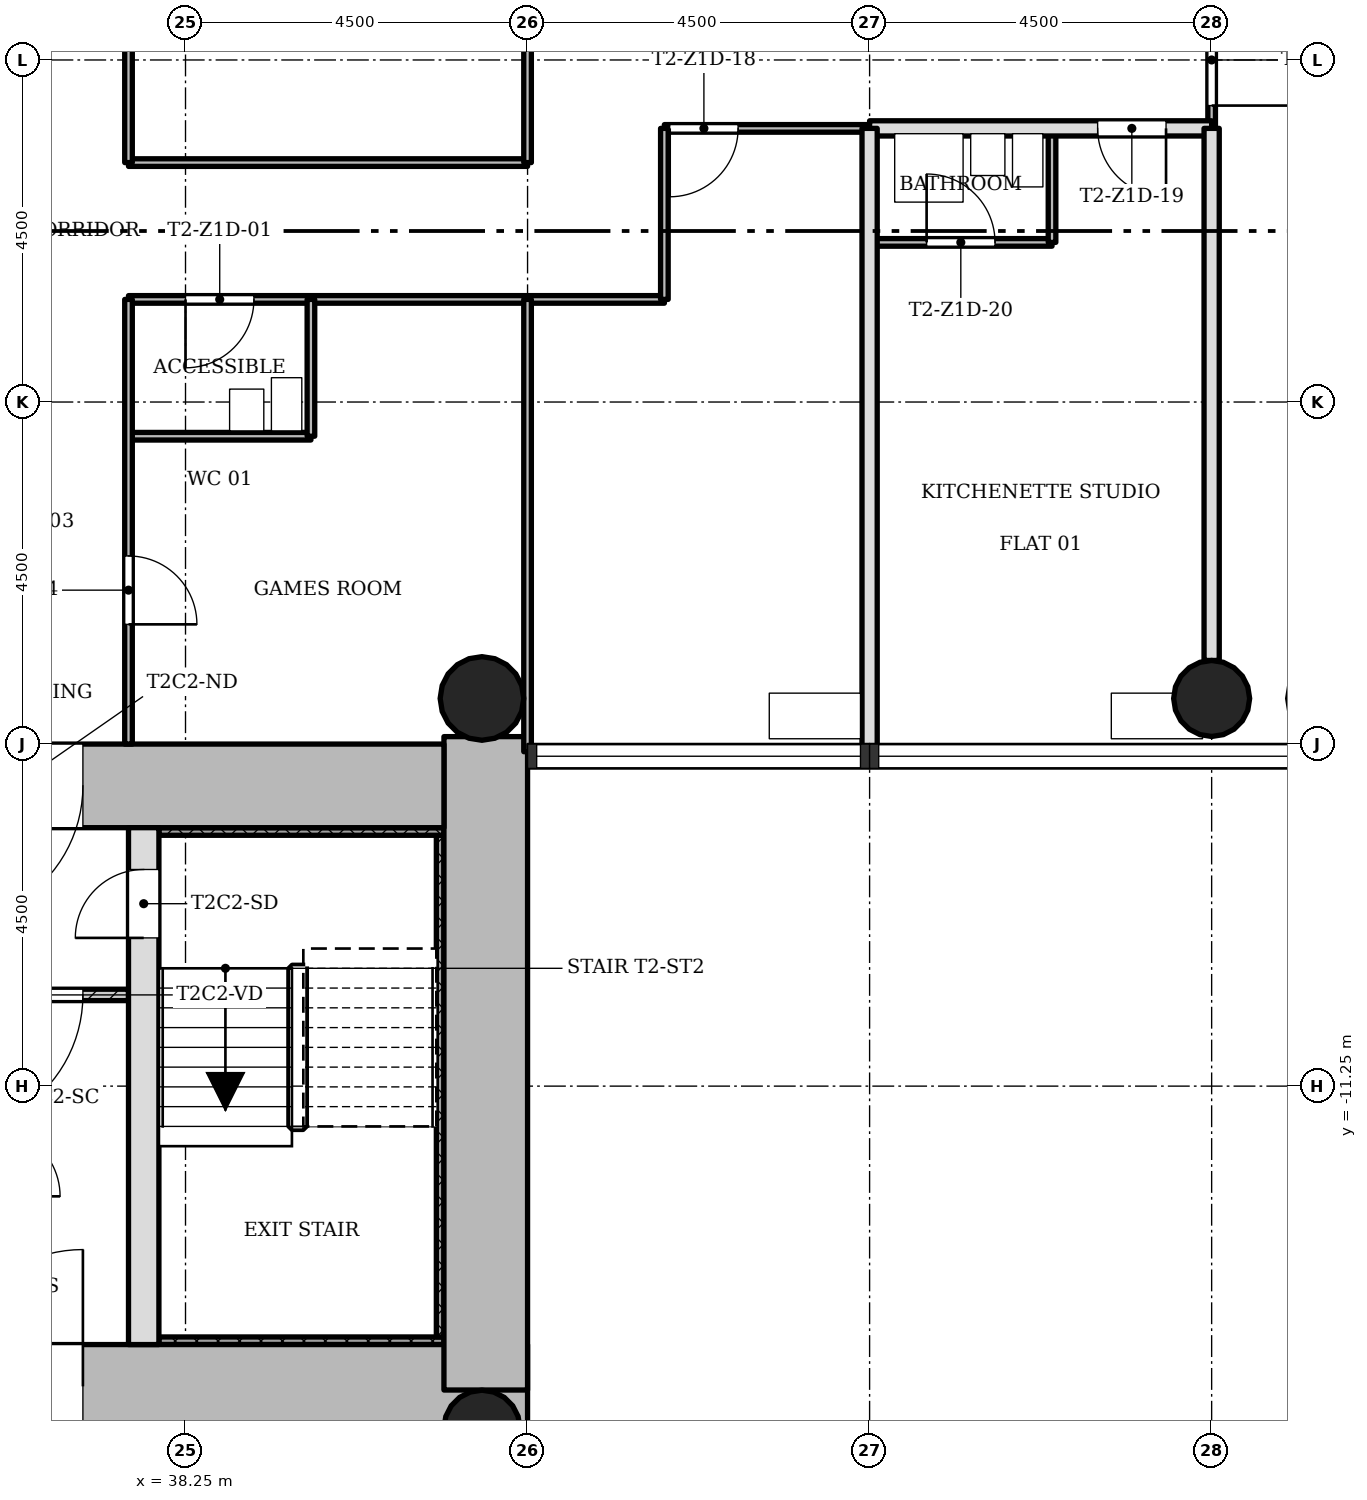
"""IFC4 building model, lengths in metres.
Left out: names, types, materials, properties, quantities, classifications, styles, units other than length and angle.
Written with IfcOpenShell. Run it as: python <this file> out.ifc"""

import sys

from ifc_helpers import new_model, si_unit, direction, frame, frame_2d, origin, origin_2d, place, context, subcontext, project, spatial, rectangle, hollow_circle, extrude, element, fill, save


model = new_model("IFC4")
c1 = context("Model", 3, precision=1e-05, world=origin(), true_north=direction((0.0, 1.0)))
c2 = subcontext(c1, "Body", "Model", "MODEL_VIEW")
j1 = project(units=[si_unit("LENGTHUNIT", "METRE"), si_unit("PLANEANGLEUNIT", "RADIAN")], contexts=[c1])
p1 = place(None, origin())
s1 = spatial("IfcSite", under=j1, at=p1, CompositionType="ELEMENT")
p2 = place(p1, origin())
s2 = spatial("IfcBuilding", under=s1, at=p2, CompositionType="ELEMENT")
p3 = place(p2, frame((0.0, 0.0, 55.1)))
s3 = spatial("IfcBuildingStorey", under=s2, at=p3, CompositionType="ELEMENT", Elevation=55.1)
p4 = place(p3, frame((30.35, -15.2, 0.0), z_axis=(0.0, 0.0, 1.0), x_axis=(1.0, 0.0, 0.0)))
e1 = element("IfcWall", 1, at=p4, inside=s3, PredefinedType="SHEAR", context=c2, shape_type="SweptSolid", body=[
    extrude(rectangle(XDim=12.4, YDim=1.1, at=frame_2d((6.2, 0.0))), origin(), (0.0, 0.0, 1.0), 3.4),
])
p5 = place(p4, frame((4.75, 0.0, 0.0)))
e2 = element("IfcOpeningElement", 2, at=p5, cuts=e1, PredefinedType="OPENING", context=c2, shape_type="SweptSolid", body=[
    extrude(rectangle(XDim=1.8, YDim=2.1, at=frame_2d((0.9, 1.05))), frame((0.0, 0.56, 0.0), z_axis=(0.0, -1.0, 0.0), x_axis=(1.0, 0.0, 0.0)), (0.0, 0.0, 1.0), 1.12),
])
p6 = place(p3, frame((42.2, -15.248, 0.0), z_axis=(0.0, 0.0, 1.0), x_axis=(0.0, 1.0, 0.0)))
e3 = element("IfcWall", 3, at=p6, inside=s3, PredefinedType="SHEAR", context=c2, shape_type="SweptSolid", body=[
    extrude(rectangle(XDim=8.596, YDim=1.1, at=frame_2d((4.298, 0.0))), origin(), (0.0, 0.0, 1.0), 3.4),
])
p7 = place(p3, frame((41.65, -7.3, 0.0), z_axis=(0.0, 0.0, 1.0), x_axis=(-1.0, 0.0, 0.0)))
e4 = element("IfcWall", 4, at=p7, inside=s3, PredefinedType="SHEAR", context=c2, shape_type="SweptSolid", body=[
    extrude(rectangle(XDim=12.4, YDim=1.1, at=frame_2d((6.2, 0.0))), origin(), (0.0, 0.0, 1.0), 3.4),
])
p8 = place(p7, frame((4.75, 0.0, 0.0)))
e5 = element("IfcOpeningElement", 5, at=p8, cuts=e4, PredefinedType="OPENING", context=c2, shape_type="SweptSolid", body=[
    extrude(rectangle(XDim=1.8, YDim=2.1, at=frame_2d((0.9, 1.05))), frame((0.0, 0.56, 0.0), z_axis=(0.0, -1.0, 0.0), x_axis=(1.0, 0.0, 0.0)), (0.0, 0.0, 1.0), 1.12),
])
p9 = place(p3, frame((37.7, -14.65, 0.0), z_axis=(0.0, 0.0, 1.0), x_axis=(0.0, 1.0, 0.0)))
e6 = element("IfcWall", 6, at=p9, inside=s3, PredefinedType="SHEAR", context=c2, shape_type="SweptSolid", body=[
    extrude(rectangle(XDim=6.8, YDim=0.4, at=frame_2d((3.4, 0.0))), origin(), (0.0, 0.0, 1.0), 3.4),
])
p10 = place(p9, frame((5.35, 0.0, 0.0)))
e7 = element("IfcOpeningElement", 7, at=p10, cuts=e6, PredefinedType="OPENING", context=c2, shape_type="SweptSolid", body=[
    extrude(rectangle(XDim=0.9, YDim=2.1, at=frame_2d((0.45, 1.05))), frame((0.0, 0.21, 0.0), z_axis=(0.0, -1.0, 0.0), x_axis=(1.0, 0.0, 0.0)), (0.0, 0.0, 1.0), 0.42),
])
for number, where, z_axis, x_axis in (
    (8, (42.15, -15.75, 0.0), (0.0, 0.0, 1.0), (1.0, 0.0, 0.0)),
    (9, (51.75, -6.15, 0.0), (0.0, 0.0, 1.0), (1.0, 0.0, 0.0)),
):
    element("IfcColumn", number, at=place(p3, frame(where, z_axis=z_axis, x_axis=x_axis)), inside=s3, PredefinedType="COLUMN", context=c2, shape_type="SweptSolid", body=[
        extrude(hollow_circle(Radius=0.5, WallThickness=0.036, at=origin_2d()), origin(), (0.0, 0.0, 1.0), 3.4),
    ])
p11 = place(p3, frame((42.15, -6.15, 0.0), z_axis=(0.0, 0.0, 1.0), x_axis=(1.0, 0.0, 0.0)))
e10 = element("IfcColumn", 10, at=p11, inside=s3, PredefinedType="COLUMN", context=c2, shape_type="SweptSolid", body=[
    extrude(hollow_circle(Radius=0.55, WallThickness=0.04, at=origin_2d()), origin(), (0.0, 0.0, 1.0), 3.4),
])
p12 = place(p3, frame((34.5, -10.05, 0.0), z_axis=(0.0, 0.0, 1.0), x_axis=(1.0, 0.0, 0.0)))
e11 = element("IfcWall", 11, at=p12, inside=s3, PredefinedType="PARTITIONING", context=c2, shape_type="SweptSolid", body=[
    extrude(rectangle(XDim=3.0, YDim=0.15, at=frame_2d((1.5, 0.0))), origin(), (0.0, 0.0, 1.0), 3.0),
])
p13 = place(p12, frame((0.6, 0.0, 0.0)))
e12 = element("IfcOpeningElement", 12, at=p13, cuts=e11, PredefinedType="OPENING", context=c2, shape_type="SweptSolid", body=[
    extrude(rectangle(XDim=1.8, YDim=2.1, at=frame_2d((0.9, 1.05))), frame((0.0, 0.085, 0.0), z_axis=(0.0, -1.0, 0.0), x_axis=(1.0, 0.0, 0.0)), (0.0, 0.0, 1.0), 0.17),
])
p14 = place(p3, frame((39.9, -2.7, 0.0), z_axis=(0.0, 0.0, 1.0), x_axis=(-1.0, 0.0, 0.0)))
e13 = element("IfcWall", 13, at=p14, inside=s3, PredefinedType="PARTITIONING", context=c2, shape_type="SweptSolid", body=[
    extrude(rectangle(XDim=2.4, YDim=0.1, at=frame_2d((1.2, 0.0))), origin(), (0.0, 0.0, 1.0), 3.0),
])
p15 = place(p3, frame((44.55, -0.9, 0.0), z_axis=(0.0, 0.0, 1.0), x_axis=(-1.0, 0.0, 0.0)))
e14 = element("IfcWall", 14, at=p15, inside=s3, PredefinedType="PARTITIONING", context=c2, shape_type="SweptSolid", body=[
    extrude(rectangle(XDim=7.05, YDim=0.1, at=frame_2d((3.525, 0.0))), origin(), (0.0, 0.0, 1.0), 3.0),
])
p16 = place(p15, frame((5.4, 0.0, 0.0)))
e15 = element("IfcOpeningElement", 15, at=p16, cuts=e14, PredefinedType="OPENING", context=c2, shape_type="SweptSolid", body=[
    extrude(rectangle(XDim=0.9, YDim=2.1, at=frame_2d((0.45, 1.05))), frame((0.0, 0.06, 0.0), z_axis=(0.0, -1.0, 0.0), x_axis=(1.0, 0.0, 0.0)), (0.0, 0.0, 1.0), 0.12),
])
p17 = place(p3, frame((49.65, -0.15, 0.0), z_axis=(0.0, 0.0, 1.0), x_axis=(-1.0, 0.0, 0.0)))
e16 = element("IfcWall", 16, at=p17, inside=s3, PredefinedType="PARTITIONING", context=c2, shape_type="SweptSolid", body=[
    extrude(rectangle(XDim=2.4, YDim=0.1, at=frame_2d((1.2, 0.0))), origin(), (0.0, 0.0, 1.0), 3.0),
])
p18 = place(p17, frame((0.75, 0.0, 0.0)))
e17 = element("IfcOpeningElement", 17, at=p18, cuts=e16, PredefinedType="OPENING", context=c2, shape_type="SweptSolid", body=[
    extrude(rectangle(XDim=0.9, YDim=2.1, at=frame_2d((0.45, 1.05))), frame((0.0, 0.06, 0.0), z_axis=(0.0, -1.0, 0.0), x_axis=(1.0, 0.0, 0.0)), (0.0, 0.0, 1.0), 0.12),
])
p19 = place(p3, frame((42.75, 0.9, 0.0), z_axis=(0.0, 0.0, 1.0), x_axis=(-1.0, 0.0, 0.0)))
e18 = element("IfcWall", 18, at=p19, inside=s3, PredefinedType="PARTITIONING", context=c2, shape_type="SweptSolid", body=[
    extrude(rectangle(XDim=5.25, YDim=0.1, at=frame_2d((2.625, 0.0))), origin(), (0.0, 0.0, 1.0), 3.0),
])
p20 = place(p3, frame((47.25, 1.35, 0.0), z_axis=(0.0, 0.0, 1.0), x_axis=(-1.0, 0.0, 0.0)))
e19 = element("IfcWall", 19, at=p20, inside=s3, PredefinedType="PARTITIONING", context=c2, shape_type="SweptSolid", body=[
    extrude(rectangle(XDim=2.7, YDim=0.1, at=frame_2d((1.35, 0.0))), origin(), (0.0, 0.0, 1.0), 3.0),
])
p21 = place(p20, frame((1.73, 0.0, 0.0)))
e20 = element("IfcOpeningElement", 20, at=p21, cuts=e19, PredefinedType="OPENING", context=c2, shape_type="SweptSolid", body=[
    extrude(rectangle(XDim=0.9, YDim=2.1, at=frame_2d((0.45, 1.05))), frame((0.0, 0.06, 0.0), z_axis=(0.0, -1.0, 0.0), x_axis=(1.0, 0.0, 0.0)), (0.0, 0.0, 1.0), 0.12),
])
p22 = place(p3, frame((51.75, 1.35, 0.0), z_axis=(0.0, 0.0, 1.0), x_axis=(-1.0, 0.0, 0.0)))
e21 = element("IfcWall", 21, at=p22, inside=s3, PredefinedType="SOLIDWALL", context=c2, shape_type="SweptSolid", body=[
    extrude(rectangle(XDim=4.5, YDim=0.2, at=frame_2d((2.25, 0.0))), origin(), (0.0, 0.0, 1.0), 3.0),
])
p23 = place(p22, frame((0.6, 0.0, 0.0)))
e22 = element("IfcOpeningElement", 22, at=p23, cuts=e21, PredefinedType="OPENING", context=c2, shape_type="SweptSolid", body=[
    extrude(rectangle(XDim=0.9, YDim=2.1, at=frame_2d((0.45, 1.05))), frame((0.0, 0.11, 0.0), z_axis=(0.0, -1.0, 0.0), x_axis=(1.0, 0.0, 0.0)), (0.0, 0.0, 1.0), 0.22),
])
p24 = place(p3, frame((51.75, 1.35, 0.0), z_axis=(0.0, 0.0, 1.0), x_axis=(0.0, 1.0, 0.0)))
e23 = element("IfcWall", 23, at=p24, inside=s3, PredefinedType="PARTITIONING", context=c2, shape_type="SweptSolid", body=[
    extrude(rectangle(XDim=4.3, YDim=0.1, at=frame_2d((2.15, 0.0))), origin(), (0.0, 0.0, 1.0), 3.0),
])
p25 = place(p24, frame((0.3, 0.0, 0.0)))
e24 = element("IfcOpeningElement", 24, at=p25, cuts=e23, PredefinedType="OPENING", context=c2, shape_type="SweptSolid", body=[
    extrude(rectangle(XDim=1.2, YDim=2.1, at=frame_2d((0.6, 1.05))), frame((0.0, 0.06, 0.0), z_axis=(0.0, -1.0, 0.0), x_axis=(1.0, 0.0, 0.0)), (0.0, 0.0, 1.0), 0.12),
])
p26 = place(p3, frame((51.75, -5.65, 0.0), z_axis=(0.0, 0.0, 1.0), x_axis=(0.0, 1.0, 0.0)))
e25 = element("IfcWall", 25, at=p26, inside=s3, PredefinedType="SOLIDWALL", context=c2, shape_type="SweptSolid", body=[
    extrude(rectangle(XDim=7.0, YDim=0.2, at=frame_2d((3.5, 0.0))), origin(), (0.0, 0.0, 1.0), 3.0),
])
p27 = place(p3, frame((49.65, -0.15, 0.0), z_axis=(0.0, 0.0, 1.0), x_axis=(0.0, 1.0, 0.0)))
e26 = element("IfcWall", 26, at=p27, inside=s3, PredefinedType="PARTITIONING", context=c2, shape_type="SweptSolid", body=[
    extrude(rectangle(XDim=1.5, YDim=0.1, at=frame_2d((0.75, 0.0))), origin(), (0.0, 0.0, 1.0), 3.0),
])
p28 = place(p3, frame((47.25, -6.85, 0.0), z_axis=(0.0, 0.0, 1.0), x_axis=(0.0, 1.0, 0.0)))
e27 = element("IfcWall", 27, at=p28, inside=s3, PredefinedType="SOLIDWALL", context=c2, shape_type="SweptSolid", body=[
    extrude(rectangle(XDim=8.2, YDim=0.2, at=frame_2d((4.1, 0.0))), origin(), (0.0, 0.0, 1.0), 3.0),
])
p29 = place(p3, frame((44.55, -0.9, 0.0), z_axis=(0.0, 0.0, 1.0), x_axis=(0.0, 1.0, 0.0)))
e28 = element("IfcWall", 28, at=p29, inside=s3, PredefinedType="PARTITIONING", context=c2, shape_type="SweptSolid", body=[
    extrude(rectangle(XDim=2.25, YDim=0.1, at=frame_2d((1.125, 0.0))), origin(), (0.0, 0.0, 1.0), 3.0),
])
for number, where, z_axis, x_axis in (
    (29, (42.75, -6.85, 0.0), (0.0, 0.0, 1.0), (0.0, 1.0, 0.0)),
    (30, (42.75, 0.9, 0.0), (0.0, 0.0, 1.0), (0.0, 1.0, 0.0)),
):
    element("IfcWall", number, at=place(p3, frame(where, z_axis=z_axis, x_axis=x_axis)), inside=s3, PredefinedType="PARTITIONING", context=c2, shape_type="SweptSolid", body=[
        extrude(rectangle(XDim=5.95, YDim=0.1, at=frame_2d((2.975, 0.0))), origin(), (0.0, 0.0, 1.0), 3.0),
    ])
p30 = place(p3, frame((39.9, -2.7, 0.0), z_axis=(0.0, 0.0, 1.0), x_axis=(0.0, 1.0, 0.0)))
e31 = element("IfcWall", 31, at=p30, inside=s3, PredefinedType="PARTITIONING", context=c2, shape_type="SweptSolid", body=[
    extrude(rectangle(XDim=1.8, YDim=0.1, at=frame_2d((0.9, 0.0))), origin(), (0.0, 0.0, 1.0), 3.0),
])
p31 = place(p3, frame((37.5, -6.75, 0.0), z_axis=(0.0, 0.0, 1.0), x_axis=(0.0, 1.0, 0.0)))
e32 = element("IfcWall", 32, at=p31, inside=s3, PredefinedType="PARTITIONING", context=c2, shape_type="SweptSolid", body=[
    extrude(rectangle(XDim=5.85, YDim=0.1, at=frame_2d((2.925, 0.0))), origin(), (0.0, 0.0, 1.0), 3.0),
])
p32 = place(p31, frame((1.575, 0.0, 0.0)))
e33 = element("IfcOpeningElement", 33, at=p32, cuts=e32, PredefinedType="OPENING", context=c2, shape_type="SweptSolid", body=[
    extrude(rectangle(XDim=0.9, YDim=2.1, at=frame_2d((0.45, 1.05))), frame((0.0, 0.06, 0.0), z_axis=(0.0, -1.0, 0.0), x_axis=(1.0, 0.0, 0.0)), (0.0, 0.0, 1.0), 0.12),
])
p33 = place(p3, frame((37.5, 0.9, 0.0), z_axis=(0.0, 0.0, 1.0), x_axis=(0.0, 1.0, 0.0)))
e34 = element("IfcWall", 34, at=p33, inside=s3, PredefinedType="PARTITIONING", context=c2, shape_type="SweptSolid", body=[
    extrude(rectangle(XDim=5.85, YDim=0.1, at=frame_2d((2.925, 0.0))), origin(), (0.0, 0.0, 1.0), 3.0),
])
p34 = place(p33, frame((2.475, 0.0, 0.0)))
e35 = element("IfcOpeningElement", 35, at=p34, cuts=e34, PredefinedType="OPENING", context=c2, shape_type="SweptSolid", body=[
    extrude(rectangle(XDim=0.9, YDim=2.1, at=frame_2d((0.45, 1.05))), frame((0.0, 0.06, 0.0), z_axis=(0.0, -1.0, 0.0), x_axis=(1.0, 0.0, 0.0)), (0.0, 0.0, 1.0), 0.12),
])
p35 = place(p3, frame((37.9, -14.6, 0.0), z_axis=(0.0, 0.0, 1.0), x_axis=(1.0, 0.0, 0.0)))
e36 = element("IfcWall", 36, at=p35, inside=s3, PredefinedType="SHEAR", context=c2, shape_type="SweptSolid", body=[
    extrude(rectangle(XDim=3.75, YDim=0.1, at=frame_2d((1.875, 0.0))), origin(), (0.0, 0.0, 1.0), 3.4),
])
p36 = place(p3, frame((41.6, -7.95, 0.0), z_axis=(0.0, 0.0, 1.0), x_axis=(0.0, -1.0, 0.0)))
e37 = element("IfcWall", 37, at=p36, inside=s3, PredefinedType="SHEAR", context=c2, shape_type="SweptSolid", body=[
    extrude(rectangle(XDim=6.6, YDim=0.1, at=frame_2d((3.3, 0.0))), origin(), (0.0, 0.0, 1.0), 3.4),
])
p37 = place(p3, frame((37.9, -7.9, 0.0), z_axis=(0.0, 0.0, 1.0), x_axis=(1.0, 0.0, 0.0)))
e38 = element("IfcWall", 38, at=p37, inside=s3, PredefinedType="SHEAR", context=c2, shape_type="SweptSolid", body=[
    extrude(rectangle(XDim=3.75, YDim=0.1, at=frame_2d((1.875, 0.0))), origin(), (0.0, 0.0, 1.0), 3.4),
])
p38 = place(p13, origin())
e39 = element("IfcDoor", 39, at=p38, inside=s3, OperationType="SINGLE_SWING_LEFT", PredefinedType="DOOR", context=c2, shape_type="SweptSolid", body=[
    extrude(rectangle(XDim=1.8, YDim=2.1, at=frame_2d((0.9, 1.05))), frame((0.0, 0.025, 0.0), z_axis=(0.0, -1.0, 0.0), x_axis=(1.0, 0.0, 0.0)), (0.0, 0.0, 1.0), 0.05),
])
fill(e12, e39)
p39 = place(p16, origin())
e40 = element("IfcDoor", 40, at=p39, inside=s3, OperationType="SINGLE_SWING_LEFT", PredefinedType="DOOR", context=c2, shape_type="SweptSolid", body=[
    extrude(rectangle(XDim=0.9, YDim=2.1, at=frame_2d((0.45, 1.05))), frame((0.0, 0.025, 0.0), z_axis=(0.0, -1.0, 0.0), x_axis=(1.0, 0.0, 0.0)), (0.0, 0.0, 1.0), 0.05),
])
fill(e15, e40)
p40 = place(p32, origin())
e41 = element("IfcDoor", 41, at=p40, inside=s3, OperationType="SINGLE_SWING_LEFT", PredefinedType="DOOR", context=c2, shape_type="SweptSolid", body=[
    extrude(rectangle(XDim=0.9, YDim=2.1, at=frame_2d((0.45, 1.05))), frame((0.0, 0.025, 0.0), z_axis=(0.0, -1.0, 0.0), x_axis=(1.0, 0.0, 0.0)), (0.0, 0.0, 1.0), 0.05),
])
fill(e33, e41)
p41 = place(p21, origin())
e42 = element("IfcDoor", 42, at=p41, inside=s3, OperationType="SINGLE_SWING_LEFT", PredefinedType="DOOR", context=c2, shape_type="SweptSolid", body=[
    extrude(rectangle(XDim=0.9, YDim=2.1, at=frame_2d((0.45, 1.05))), frame((0.0, 0.025, 0.0), z_axis=(0.0, -1.0, 0.0), x_axis=(1.0, 0.0, 0.0)), (0.0, 0.0, 1.0), 0.05),
])
fill(e20, e42)
p42 = place(p23, origin())
e43 = element("IfcDoor", 43, at=p42, inside=s3, OperationType="SINGLE_SWING_RIGHT", PredefinedType="DOOR", context=c2, shape_type="SweptSolid", body=[
    extrude(rectangle(XDim=0.9, YDim=2.1, at=frame_2d((0.45, 1.05))), frame((0.0, 0.025, 0.0), z_axis=(0.0, -1.0, 0.0), x_axis=(1.0, 0.0, 0.0)), (0.0, 0.0, 1.0), 0.05),
])
fill(e22, e43)
p43 = place(p18, origin())
e44 = element("IfcDoor", 44, at=p43, inside=s3, OperationType="SINGLE_SWING_RIGHT", PredefinedType="DOOR", context=c2, shape_type="SweptSolid", body=[
    extrude(rectangle(XDim=0.9, YDim=2.1, at=frame_2d((0.45, 1.05))), frame((0.0, 0.025, 0.0), z_axis=(0.0, -1.0, 0.0), x_axis=(1.0, 0.0, 0.0)), (0.0, 0.0, 1.0), 0.05),
])
fill(e17, e44)
p44 = place(p25, origin())
e45 = element("IfcDoor", 45, at=p44, inside=s3, OperationType="SINGLE_SWING_LEFT", PredefinedType="DOOR", context=c2, shape_type="SweptSolid", body=[
    extrude(rectangle(XDim=1.2, YDim=2.1, at=frame_2d((0.6, 1.05))), frame((0.0, 0.025, 0.0), z_axis=(0.0, -1.0, 0.0), x_axis=(1.0, 0.0, 0.0)), (0.0, 0.0, 1.0), 0.05),
])
fill(e24, e45)
p45 = place(p10, origin())
e46 = element("IfcDoor", 46, at=p45, inside=s3, OperationType="SINGLE_SWING_RIGHT", PredefinedType="DOOR", context=c2, shape_type="SweptSolid", body=[
    extrude(rectangle(XDim=0.9, YDim=2.1, at=frame_2d((0.45, 1.05))), frame((0.0, 0.025, 0.0), z_axis=(0.0, -1.0, 0.0), x_axis=(1.0, 0.0, 0.0)), (0.0, 0.0, 1.0), 0.05),
])
fill(e7, e46)
p46 = place(p8, origin())
e47 = element("IfcDoor", 47, at=p46, inside=s3, OperationType="SINGLE_SWING_LEFT", PredefinedType="DOOR", context=c2, shape_type="SweptSolid", body=[
    extrude(rectangle(XDim=1.8, YDim=2.1, at=frame_2d((0.9, 1.05))), frame((0.0, 0.025, 0.0), z_axis=(0.0, -1.0, 0.0), x_axis=(1.0, 0.0, 0.0)), (0.0, 0.0, 1.0), 0.05),
])
fill(e5, e47)
p47 = place(p5, origin())
e48 = element("IfcDoor", 48, at=p47, inside=s3, OperationType="SINGLE_SWING_LEFT", PredefinedType="DOOR", context=c2, shape_type="SweptSolid", body=[
    extrude(rectangle(XDim=1.8, YDim=2.1, at=frame_2d((0.9, 1.05))), frame((0.0, 0.025, 0.0), z_axis=(0.0, -1.0, 0.0), x_axis=(1.0, 0.0, 0.0)), (0.0, 0.0, 1.0), 0.05),
])
fill(e2, e48)
save(model, sys.argv[1])
